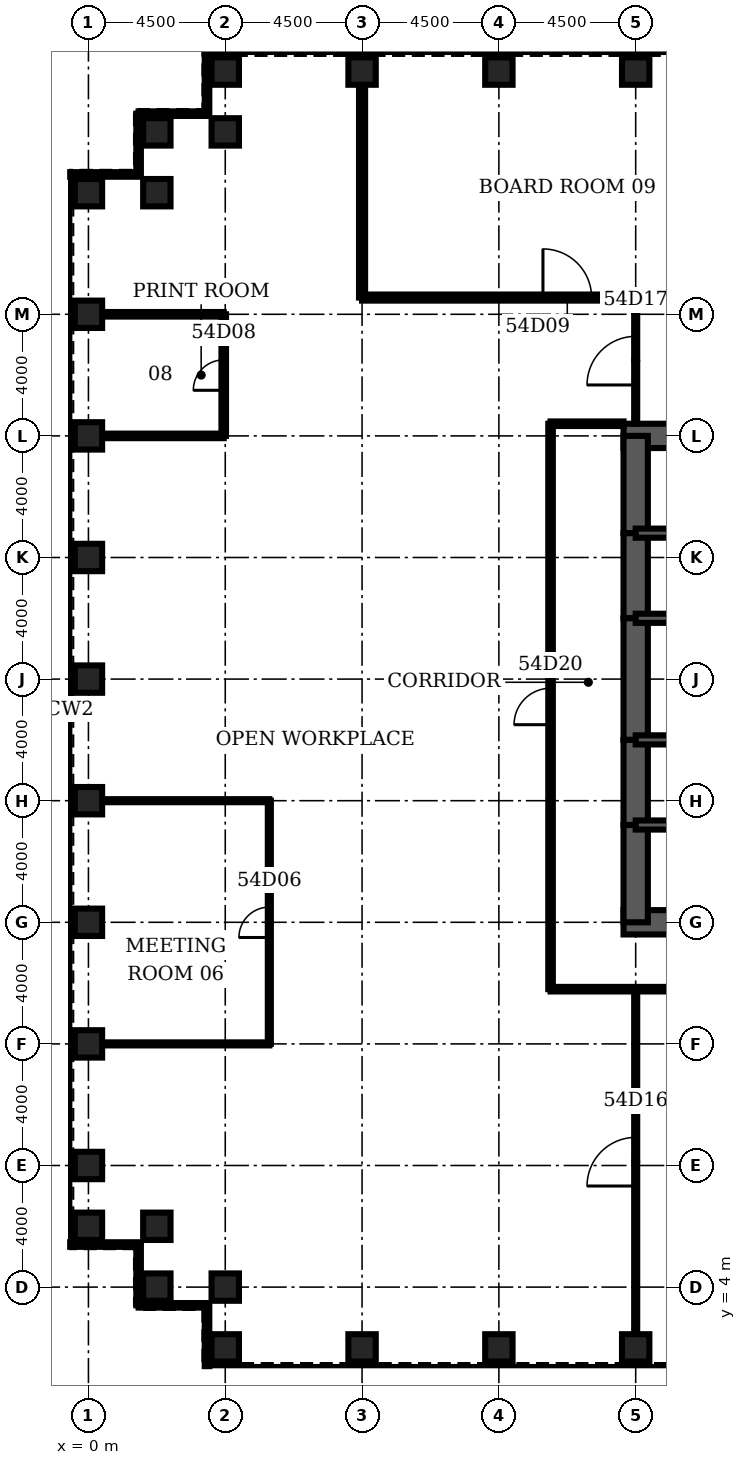
"""IFC4 building model, lengths in metres.
Left out: names, types, materials, properties, quantities, classifications, styles, units other than length and angle.
Written with IfcOpenShell. Run it as: python <this file> out.ifc"""

import sys

from ifc_helpers import new_model, si_unit, direction, frame, frame_2d, origin, origin_2d, place, context, subcontext, project, spatial, rectangle, hollow_rectangle, extrude, element, fill, save


model = new_model("IFC4")
c1 = context("Model", 3, precision=1e-05, world=origin(), true_north=direction((0.0, 1.0)))
c2 = subcontext(c1, "Body", "Model", "MODEL_VIEW")
j1 = project(units=[si_unit("LENGTHUNIT", "METRE"), si_unit("PLANEANGLEUNIT", "RADIAN")], contexts=[c1])
p1 = place(None, origin())
s1 = spatial("IfcSite", under=j1, at=p1, CompositionType="ELEMENT")
p2 = place(p1, origin())
s2 = spatial("IfcBuilding", under=s1, at=p2, CompositionType="ELEMENT")
p3 = place(p2, frame((0.0, 0.0, 240.4)))
s3 = spatial("IfcBuildingStorey", under=s2, at=p3, CompositionType="ELEMENT", Elevation=240.4)
for number, where, z_axis, x_axis in (
    (1, (4.5, 2.0, 0.0), (0.0, 0.0, 1.0), (0.0, 1.0, 0.0)),
    (2, (9.0, 2.0, 0.0), (0.0, 0.0, 1.0), (0.0, 1.0, 0.0)),
    (3, (13.5, 2.0, 0.0), (0.0, 0.0, 1.0), (0.0, 1.0, 0.0)),
    (4, (18.0, 2.0, 0.0), (0.0, 0.0, 1.0), (0.0, 1.0, 0.0)),
    (5, (18.0, 44.0, 0.0), (0.0, 0.0, 1.0), (0.0, 1.0, 0.0)),
    (6, (13.5, 44.0, 0.0), (0.0, 0.0, 1.0), (0.0, 1.0, 0.0)),
    (7, (9.0, 44.0, 0.0), (0.0, 0.0, 1.0), (0.0, 1.0, 0.0)),
    (8, (4.5, 44.0, 0.0), (0.0, 0.0, 1.0), (0.0, 1.0, 0.0)),
    (9, (4.5, 42.0, 0.0), (0.0, 0.0, 1.0), (0.0, 1.0, 0.0)),
    (10, (2.25, 42.0, 0.0), (0.0, 0.0, 1.0), (1.0, 0.0, 0.0)),
    (11, (2.25, 40.0, 0.0), (0.0, 0.0, 1.0), (1.0, 0.0, 0.0)),
    (12, (0.0, 40.0, 0.0), (0.0, 0.0, 1.0), (1.0, 0.0, 0.0)),
    (13, (0.0, 36.0, 0.0), (0.0, 0.0, 1.0), (1.0, 0.0, 0.0)),
    (14, (0.0, 32.0, 0.0), (0.0, 0.0, 1.0), (1.0, 0.0, 0.0)),
    (15, (0.0, 28.0, 0.0), (0.0, 0.0, 1.0), (1.0, 0.0, 0.0)),
    (16, (0.0, 24.0, 0.0), (0.0, 0.0, 1.0), (1.0, 0.0, 0.0)),
    (17, (0.0, 20.0, 0.0), (0.0, 0.0, 1.0), (1.0, 0.0, 0.0)),
    (18, (0.0, 16.0, 0.0), (0.0, 0.0, 1.0), (1.0, 0.0, 0.0)),
    (19, (0.0, 12.0, 0.0), (0.0, 0.0, 1.0), (1.0, 0.0, 0.0)),
    (20, (0.0, 8.0, 0.0), (0.0, 0.0, 1.0), (1.0, 0.0, 0.0)),
    (21, (0.0, 6.0, 0.0), (0.0, 0.0, 1.0), (1.0, 0.0, 0.0)),
    (22, (2.25, 6.0, 0.0), (0.0, 0.0, 1.0), (1.0, 0.0, 0.0)),
    (23, (2.25, 4.0, 0.0), (0.0, 0.0, 1.0), (1.0, 0.0, 0.0)),
    (24, (4.5, 4.0, 0.0), (0.0, 0.0, 1.0), (0.0, 1.0, 0.0)),
):
    element("IfcColumn", number, at=place(p3, frame(where, z_axis=z_axis, x_axis=x_axis)), inside=s3, PredefinedType="COLUMN", context=c2, shape_type="SweptSolid", body=[
        extrude(hollow_rectangle(XDim=0.9, YDim=0.9, WallThickness=0.08, at=origin_2d()), origin(), (0.0, 0.0, 1.0), 4.2),
    ])
for number, where, z_axis, x_axis in (
    (25, (17.6, 16.0, 0.0), (0.0, 0.0, 1.0), (1.0, 0.0, 0.0)),
    (26, (27.0, 32.0, 0.0), (0.0, 0.0, 1.0), (-1.0, 0.0, 0.0)),
):
    element("IfcWall", number, at=place(p3, frame(where, z_axis=z_axis, x_axis=x_axis)), inside=s3, PredefinedType="SHEAR", context=c2, shape_type="SweptSolid", body=[
        extrude(rectangle(XDim=9.4, YDim=0.8, at=frame_2d((4.7, 0.0))), origin(), (0.0, 0.0, 1.0), 4.2),
    ])
p4 = place(p3, frame((18.0, 32.0, 0.0), z_axis=(0.0, 0.0, 1.0), x_axis=(0.0, -1.0, 0.0)))
e27 = element("IfcWall", 27, at=p4, inside=s3, PredefinedType="SHEAR", context=c2, shape_type="SweptSolid", body=[
    extrude(rectangle(XDim=3.2, YDim=0.8, at=frame_2d((1.6, 0.0))), origin(), (0.0, 0.0, 1.0), 4.2),
])
p5 = place(p3, frame((18.0, 28.8, 0.0), z_axis=(0.0, 0.0, 1.0), x_axis=(0.0, -1.0, 0.0)))
e28 = element("IfcWall", 28, at=p5, inside=s3, PredefinedType="SHEAR", context=c2, shape_type="SweptSolid", body=[
    extrude(rectangle(XDim=2.8, YDim=0.8, at=frame_2d((1.4, 0.0))), origin(), (0.0, 0.0, 1.0), 4.2),
])
p6 = place(p5, frame((0.4, 0.0, 0.0)))
e29 = element("IfcOpeningElement", 29, at=p6, cuts=e28, PredefinedType="OPENING", context=c2, shape_type="SweptSolid", body=[
    extrude(rectangle(XDim=1.8, YDim=2.1, at=frame_2d((0.9, 1.05))), frame((0.0, 0.41, 0.0), z_axis=(0.0, -1.0, 0.0), x_axis=(1.0, 0.0, 0.0)), (0.0, 0.0, 1.0), 0.82),
])
p7 = place(p3, frame((18.0, 26.0, 0.0), z_axis=(0.0, 0.0, 1.0), x_axis=(0.0, -1.0, 0.0)))
e30 = element("IfcWall", 30, at=p7, inside=s3, PredefinedType="SHEAR", context=c2, shape_type="SweptSolid", body=[
    extrude(rectangle(XDim=4.0, YDim=0.8, at=frame_2d((2.0, 0.0))), origin(), (0.0, 0.0, 1.0), 4.2),
])
p8 = place(p3, frame((18.0, 22.0, 0.0), z_axis=(0.0, 0.0, 1.0), x_axis=(0.0, -1.0, 0.0)))
e31 = element("IfcWall", 31, at=p8, inside=s3, PredefinedType="SHEAR", context=c2, shape_type="SweptSolid", body=[
    extrude(rectangle(XDim=2.8, YDim=0.8, at=frame_2d((1.4, 0.0))), origin(), (0.0, 0.0, 1.0), 4.2),
])
p9 = place(p8, frame((0.6, 0.0, 0.0)))
e32 = element("IfcOpeningElement", 32, at=p9, cuts=e31, PredefinedType="OPENING", context=c2, shape_type="SweptSolid", body=[
    extrude(rectangle(XDim=1.8, YDim=2.1, at=frame_2d((0.9, 1.05))), frame((0.0, 0.41, 0.0), z_axis=(0.0, -1.0, 0.0), x_axis=(1.0, 0.0, 0.0)), (0.0, 0.0, 1.0), 0.82),
])
p10 = place(p3, frame((18.0, 19.2, 0.0), z_axis=(0.0, 0.0, 1.0), x_axis=(0.0, -1.0, 0.0)))
e33 = element("IfcWall", 33, at=p10, inside=s3, PredefinedType="SHEAR", context=c2, shape_type="SweptSolid", body=[
    extrude(rectangle(XDim=3.2, YDim=0.8, at=frame_2d((1.6, 0.0))), origin(), (0.0, 0.0, 1.0), 4.2),
])
p11 = place(p3, frame((18.0, 19.2, 0.0), z_axis=(0.0, 0.0, 1.0), x_axis=(1.0, 0.0, 0.0)))
e34 = element("IfcWall", 34, at=p11, inside=s3, PredefinedType="SOLIDWALL", context=c2, shape_type="SweptSolid", body=[
    extrude(rectangle(XDim=9.0, YDim=0.3, at=frame_2d((4.5, 0.0))), origin(), (0.0, 0.0, 1.0), 4.2),
])
p12 = place(p11, frame((0.65, 0.0, 0.0)))
e35 = element("IfcOpeningElement", 35, at=p12, cuts=e34, PredefinedType="OPENING", context=c2, shape_type="SweptSolid", body=[
    extrude(rectangle(XDim=1.0, YDim=2.1, at=frame_2d((0.5, 1.05))), frame((0.0, 0.16, 0.0), z_axis=(0.0, -1.0, 0.0), x_axis=(1.0, 0.0, 0.0)), (0.0, 0.0, 1.0), 0.32),
])
p13 = place(p3, frame((18.0, 28.8, 0.0), z_axis=(0.0, 0.0, 1.0), x_axis=(1.0, 0.0, 0.0)))
e36 = element("IfcWall", 36, at=p13, inside=s3, PredefinedType="SOLIDWALL", context=c2, shape_type="SweptSolid", body=[
    extrude(rectangle(XDim=9.0, YDim=0.3, at=frame_2d((4.5, 0.0))), origin(), (0.0, 0.0, 1.0), 4.2),
])
p14 = place(p13, frame((0.65, 0.0, 0.0)))
e37 = element("IfcOpeningElement", 37, at=p14, cuts=e36, PredefinedType="OPENING", context=c2, shape_type="SweptSolid", body=[
    extrude(rectangle(XDim=1.0, YDim=2.1, at=frame_2d((0.5, 1.05))), frame((0.0, 0.16, 0.0), z_axis=(0.0, -1.0, 0.0), x_axis=(1.0, 0.0, 0.0)), (0.0, 0.0, 1.0), 0.32),
])
p15 = place(p3, frame((18.0, 22.0, 0.0), z_axis=(0.0, 0.0, 1.0), x_axis=(1.0, 0.0, 0.0)))
e38 = element("IfcWall", 38, at=p15, inside=s3, PredefinedType="SOLIDWALL", context=c2, shape_type="SweptSolid", body=[
    extrude(rectangle(XDim=6.0, YDim=0.3, at=frame_2d((3.0, 0.0))), origin(), (0.0, 0.0, 1.0), 4.2),
])
p16 = place(p15, frame((4.4, 0.0, 0.0)))
e39 = element("IfcOpeningElement", 39, at=p16, cuts=e38, PredefinedType="OPENING", context=c2, shape_type="SweptSolid", body=[
    extrude(rectangle(XDim=1.0, YDim=2.1, at=frame_2d((0.5, 1.05))), frame((0.0, 0.16, 0.0), z_axis=(0.0, -1.0, 0.0), x_axis=(1.0, 0.0, 0.0)), (0.0, 0.0, 1.0), 0.32),
])
p17 = place(p15, frame((0.65, 0.0, 0.0)))
e40 = element("IfcOpeningElement", 40, at=p17, cuts=e38, PredefinedType="OPENING", context=c2, shape_type="SweptSolid", body=[
    extrude(rectangle(XDim=1.0, YDim=2.1, at=frame_2d((0.5, 1.05))), frame((0.0, 0.16, 0.0), z_axis=(0.0, -1.0, 0.0), x_axis=(1.0, 0.0, 0.0)), (0.0, 0.0, 1.0), 0.32),
])
p18 = place(p3, frame((18.0, 26.0, 0.0), z_axis=(0.0, 0.0, 1.0), x_axis=(1.0, 0.0, 0.0)))
e41 = element("IfcWall", 41, at=p18, inside=s3, PredefinedType="SOLIDWALL", context=c2, shape_type="SweptSolid", body=[
    extrude(rectangle(XDim=6.0, YDim=0.3, at=frame_2d((3.0, 0.0))), origin(), (0.0, 0.0, 1.0), 4.2),
])
p19 = place(p3, frame((0.45, 12.0, 0.0), z_axis=(0.0, 0.0, 1.0), x_axis=(1.0, 0.0, 0.0)))
e42 = element("IfcWall", 42, at=p19, inside=s3, PredefinedType="PARTITIONING", context=c2, shape_type="SweptSolid", body=[
    extrude(rectangle(XDim=5.5, YDim=0.1, at=frame_2d((2.75, 0.0))), origin(), (0.0, 0.0, 1.0), 3.0),
])
p20 = place(p3, frame((15.2, 13.8, 0.0), z_axis=(0.0, 0.0, 1.0), x_axis=(1.0, 0.0, 0.0)))
e43 = element("IfcWall", 43, at=p20, inside=s3, PredefinedType="PARTITIONING", context=c2, shape_type="SweptSolid", body=[
    extrude(rectangle(XDim=6.8, YDim=0.15, at=frame_2d((3.4, 0.0))), origin(), (0.0, 0.0, 1.0), 3.0),
])
p21 = place(p3, frame((0.45, 20.0, 0.0), z_axis=(0.0, 0.0, 1.0), x_axis=(1.0, 0.0, 0.0)))
e44 = element("IfcWall", 44, at=p21, inside=s3, PredefinedType="PARTITIONING", context=c2, shape_type="SweptSolid", body=[
    extrude(rectangle(XDim=5.5, YDim=0.1, at=frame_2d((2.75, 0.0))), origin(), (0.0, 0.0, 1.0), 3.0),
])
p22 = place(p3, frame((0.45, 32.0, 0.0), z_axis=(0.0, 0.0, 1.0), x_axis=(1.0, 0.0, 0.0)))
e45 = element("IfcWall", 45, at=p22, inside=s3, PredefinedType="PARTITIONING", context=c2, shape_type="SweptSolid", body=[
    extrude(rectangle(XDim=4.0, YDim=0.15, at=frame_2d((2.0, 0.0))), origin(), (0.0, 0.0, 1.0), 3.0),
])
p23 = place(p3, frame((15.2, 32.4, 0.0), z_axis=(0.0, 0.0, 1.0), x_axis=(1.0, 0.0, 0.0)))
e46 = element("IfcWall", 46, at=p23, inside=s3, PredefinedType="PARTITIONING", context=c2, shape_type="SweptSolid", body=[
    extrude(rectangle(XDim=2.4, YDim=0.15, at=frame_2d((1.2, 0.0))), origin(), (0.0, 0.0, 1.0), 3.0),
])
p24 = place(p3, frame((0.45, 36.0, 0.0), z_axis=(0.0, 0.0, 1.0), x_axis=(1.0, 0.0, 0.0)))
e47 = element("IfcWall", 47, at=p24, inside=s3, PredefinedType="PARTITIONING", context=c2, shape_type="SweptSolid", body=[
    extrude(rectangle(XDim=4.0, YDim=0.15, at=frame_2d((2.0, 0.0))), origin(), (0.0, 0.0, 1.0), 3.0),
])
p25 = place(p3, frame((9.0, 36.55, 0.0), z_axis=(0.0, 0.0, 1.0), x_axis=(1.0, 0.0, 0.0)))
e48 = element("IfcWall", 48, at=p25, inside=s3, PredefinedType="PARTITIONING", context=c2, shape_type="SweptSolid", body=[
    extrude(rectangle(XDim=13.5, YDim=0.2, at=frame_2d((6.75, 0.0))), origin(), (0.0, 0.0, 1.0), 3.0),
])
p26 = place(p25, frame((5.95, 0.0, 0.0)))
e49 = element("IfcOpeningElement", 49, at=p26, cuts=e48, PredefinedType="OPENING", context=c2, shape_type="SweptSolid", body=[
    extrude(rectangle(XDim=1.6, YDim=2.1, at=frame_2d((0.8, 1.05))), frame((0.0, 0.11, 0.0), z_axis=(0.0, -1.0, 0.0), x_axis=(1.0, 0.0, 0.0)), (0.0, 0.0, 1.0), 0.22),
])
p27 = place(p3, frame((4.45, 32.0, 0.0), z_axis=(0.0, 0.0, 1.0), x_axis=(0.0, 1.0, 0.0)))
e50 = element("IfcWall", 50, at=p27, inside=s3, PredefinedType="PARTITIONING", context=c2, shape_type="SweptSolid", body=[
    extrude(rectangle(XDim=4.0, YDim=0.15, at=frame_2d((2.0, 0.0))), origin(), (0.0, 0.0, 1.0), 3.0),
])
p28 = place(p27, frame((1.5, 0.0, 0.0)))
e51 = element("IfcOpeningElement", 51, at=p28, cuts=e50, PredefinedType="OPENING", context=c2, shape_type="SweptSolid", body=[
    extrude(rectangle(XDim=1.0, YDim=2.1, at=frame_2d((0.5, 1.05))), frame((0.0, 0.085, 0.0), z_axis=(0.0, -1.0, 0.0), x_axis=(1.0, 0.0, 0.0)), (0.0, 0.0, 1.0), 0.17),
])
p29 = place(p3, frame((5.95, 12.0, 0.0), z_axis=(0.0, 0.0, 1.0), x_axis=(0.0, 1.0, 0.0)))
e52 = element("IfcWall", 52, at=p29, inside=s3, PredefinedType="PARTITIONING", context=c2, shape_type="SweptSolid", body=[
    extrude(rectangle(XDim=8.0, YDim=0.1, at=frame_2d((4.0, 0.0))), origin(), (0.0, 0.0, 1.0), 3.0),
])
p30 = place(p29, frame((3.5, 0.0, 0.0)))
e53 = element("IfcOpeningElement", 53, at=p30, cuts=e52, PredefinedType="OPENING", context=c2, shape_type="SweptSolid", body=[
    extrude(rectangle(XDim=1.0, YDim=2.1, at=frame_2d((0.5, 1.05))), frame((0.0, 0.06, 0.0), z_axis=(0.0, -1.0, 0.0), x_axis=(1.0, 0.0, 0.0)), (0.0, 0.0, 1.0), 0.12),
])
p31 = place(p3, frame((9.0, 36.55, 0.0), z_axis=(0.0, 0.0, 1.0), x_axis=(0.0, 1.0, 0.0)))
e54 = element("IfcWall", 54, at=p31, inside=s3, PredefinedType="PARTITIONING", context=c2, shape_type="SweptSolid", body=[
    extrude(rectangle(XDim=7.0, YDim=0.2, at=frame_2d((3.5, 0.0))), origin(), (0.0, 0.0, 1.0), 3.0),
])
p32 = place(p3, frame((15.2, 13.8, 0.0), z_axis=(0.0, 0.0, 1.0), x_axis=(0.0, 1.0, 0.0)))
e55 = element("IfcWall", 55, at=p32, inside=s3, PredefinedType="PARTITIONING", context=c2, shape_type="SweptSolid", body=[
    extrude(rectangle(XDim=18.6, YDim=0.15, at=frame_2d((9.3, 0.0))), origin(), (0.0, 0.0, 1.0), 3.0),
])
p33 = place(p32, frame((8.7, 0.0, 0.0)))
e56 = element("IfcOpeningElement", 56, at=p33, cuts=e55, PredefinedType="OPENING", context=c2, shape_type="SweptSolid", body=[
    extrude(rectangle(XDim=1.2, YDim=2.1, at=frame_2d((0.6, 1.05))), frame((0.0, 0.085, 0.0), z_axis=(0.0, -1.0, 0.0), x_axis=(1.0, 0.0, 0.0)), (0.0, 0.0, 1.0), 0.17),
])
p34 = place(p3, frame((18.0, 2.45, 0.0), z_axis=(0.0, 0.0, 1.0), x_axis=(0.0, 1.0, 0.0)))
e57 = element("IfcWall", 57, at=p34, inside=s3, PredefinedType="PARTITIONING", context=c2, shape_type="SweptSolid", body=[
    extrude(rectangle(XDim=11.35, YDim=0.1, at=frame_2d((5.675, 0.0))), origin(), (0.0, 0.0, 1.0), 3.0),
])
p35 = place(p34, frame((4.875, 0.0, 0.0)))
e58 = element("IfcOpeningElement", 58, at=p35, cuts=e57, PredefinedType="OPENING", context=c2, shape_type="SweptSolid", body=[
    extrude(rectangle(XDim=1.6, YDim=2.1, at=frame_2d((0.8, 1.05))), frame((0.0, 0.06, 0.0), z_axis=(0.0, -1.0, 0.0), x_axis=(1.0, 0.0, 0.0)), (0.0, 0.0, 1.0), 0.12),
])
p36 = place(p3, frame((18.0, 32.4, 0.0), z_axis=(0.0, 0.0, 1.0), x_axis=(0.0, 1.0, 0.0)))
e59 = element("IfcWall", 59, at=p36, inside=s3, PredefinedType="PARTITIONING", context=c2, shape_type="SweptSolid", body=[
    extrude(rectangle(XDim=4.15, YDim=0.1, at=frame_2d((2.075, 0.0))), origin(), (0.0, 0.0, 1.0), 3.0),
])
p37 = place(p36, frame((1.275, 0.0, 0.0)))
e60 = element("IfcOpeningElement", 60, at=p37, cuts=e59, PredefinedType="OPENING", context=c2, shape_type="SweptSolid", body=[
    extrude(rectangle(XDim=1.6, YDim=2.1, at=frame_2d((0.8, 1.05))), frame((0.0, 0.06, 0.0), z_axis=(0.0, -1.0, 0.0), x_axis=(1.0, 0.0, 0.0)), (0.0, 0.0, 1.0), 0.12),
])
p38 = place(p3, frame((3.9, 44.6, 0.0), z_axis=(0.0, 0.0, 1.0), x_axis=(0.0, -1.0, 0.0)))
e61 = element("IfcWall", 61, at=p38, inside=s3, PredefinedType="ELEMENTEDWALL", context=c2, shape_type="SweptSolid", body=[
    extrude(rectangle(XDim=2.0, YDim=0.15, at=frame_2d((1.0, 0.0))), origin(), (0.0, 0.0, 1.0), 4.04),
])
p39 = place(p3, frame((3.9, 42.6, 0.0), z_axis=(0.0, 0.0, 1.0), x_axis=(-1.0, 0.0, 0.0)))
e62 = element("IfcWall", 62, at=p39, inside=s3, PredefinedType="ELEMENTEDWALL", context=c2, shape_type="SweptSolid", body=[
    extrude(rectangle(XDim=2.25, YDim=0.15, at=frame_2d((1.125, 0.0))), origin(), (0.0, 0.0, 1.0), 4.04),
])
p40 = place(p3, frame((1.65, 42.6, 0.0), z_axis=(0.0, 0.0, 1.0), x_axis=(0.0, -1.0, 0.0)))
e63 = element("IfcWall", 63, at=p40, inside=s3, PredefinedType="ELEMENTEDWALL", context=c2, shape_type="SweptSolid", body=[
    extrude(rectangle(XDim=2.0, YDim=0.15, at=frame_2d((1.0, 0.0))), origin(), (0.0, 0.0, 1.0), 4.04),
])
for number, where, z_axis, x_axis in (
    (64, (1.65, 40.6, 0.0), (0.0, 0.0, 1.0), (-1.0, 0.0, 0.0)),
    (65, (-0.6, 5.4, 0.0), (0.0, 0.0, 1.0), (1.0, 0.0, 0.0)),
):
    element("IfcWall", number, at=place(p3, frame(where, z_axis=z_axis, x_axis=x_axis)), inside=s3, PredefinedType="ELEMENTEDWALL", context=c2, shape_type="SweptSolid", body=[
        extrude(rectangle(XDim=2.25, YDim=0.15, at=frame_2d((1.125, 0.0))), origin(), (0.0, 0.0, 1.0), 4.04),
    ])
p41 = place(p3, frame((1.65, 5.4, 0.0), z_axis=(0.0, 0.0, 1.0), x_axis=(0.0, -1.0, 0.0)))
e66 = element("IfcWall", 66, at=p41, inside=s3, PredefinedType="ELEMENTEDWALL", context=c2, shape_type="SweptSolid", body=[
    extrude(rectangle(XDim=2.0, YDim=0.15, at=frame_2d((1.0, 0.0))), origin(), (0.0, 0.0, 1.0), 4.04),
])
p42 = place(p3, frame((1.65, 3.4, 0.0), z_axis=(0.0, 0.0, 1.0), x_axis=(1.0, 0.0, 0.0)))
e67 = element("IfcWall", 67, at=p42, inside=s3, PredefinedType="ELEMENTEDWALL", context=c2, shape_type="SweptSolid", body=[
    extrude(rectangle(XDim=2.25, YDim=0.15, at=frame_2d((1.125, 0.0))), origin(), (0.0, 0.0, 1.0), 4.04),
])
p43 = place(p3, frame((3.9, 3.4, 0.0), z_axis=(0.0, 0.0, 1.0), x_axis=(0.0, -1.0, 0.0)))
e68 = element("IfcWall", 68, at=p43, inside=s3, PredefinedType="ELEMENTEDWALL", context=c2, shape_type="SweptSolid", body=[
    extrude(rectangle(XDim=2.0, YDim=0.15, at=frame_2d((1.0, 0.0))), origin(), (0.0, 0.0, 1.0), 4.04),
])
p44 = place(p30, origin())
e69 = element("IfcDoor", 69, at=p44, inside=s3, OperationType="SINGLE_SWING_LEFT", PredefinedType="DOOR", context=c2, shape_type="SweptSolid", body=[
    extrude(rectangle(XDim=1.0, YDim=2.1, at=frame_2d((0.5, 1.05))), frame((0.0, 0.025, 0.0), z_axis=(0.0, -1.0, 0.0), x_axis=(1.0, 0.0, 0.0)), (0.0, 0.0, 1.0), 0.05),
])
fill(e53, e69)
p45 = place(p28, origin())
e70 = element("IfcDoor", 70, at=p45, inside=s3, OperationType="SINGLE_SWING_LEFT", PredefinedType="DOOR", context=c2, shape_type="SweptSolid", body=[
    extrude(rectangle(XDim=1.0, YDim=2.1, at=frame_2d((0.5, 1.05))), frame((0.0, 0.025, 0.0), z_axis=(0.0, -1.0, 0.0), x_axis=(1.0, 0.0, 0.0)), (0.0, 0.0, 1.0), 0.05),
])
fill(e51, e70)
p46 = place(p26, origin())
e71 = element("IfcDoor", 71, at=p46, inside=s3, OperationType="SINGLE_SWING_LEFT", PredefinedType="DOOR", context=c2, shape_type="SweptSolid", body=[
    extrude(rectangle(XDim=1.6, YDim=2.1, at=frame_2d((0.8, 1.05))), frame((0.0, 0.025, 0.0), z_axis=(0.0, -1.0, 0.0), x_axis=(1.0, 0.0, 0.0)), (0.0, 0.0, 1.0), 0.05),
])
fill(e49, e71)
p47 = place(p35, origin())
e72 = element("IfcDoor", 72, at=p47, inside=s3, OperationType="SINGLE_SWING_LEFT", PredefinedType="DOOR", context=c2, shape_type="SweptSolid", body=[
    extrude(rectangle(XDim=1.6, YDim=2.1, at=frame_2d((0.8, 1.05))), frame((0.0, 0.025, 0.0), z_axis=(0.0, -1.0, 0.0), x_axis=(1.0, 0.0, 0.0)), (0.0, 0.0, 1.0), 0.05),
])
fill(e58, e72)
p48 = place(p37, origin())
e73 = element("IfcDoor", 73, at=p48, inside=s3, OperationType="SINGLE_SWING_LEFT", PredefinedType="DOOR", context=c2, shape_type="SweptSolid", body=[
    extrude(rectangle(XDim=1.6, YDim=2.1, at=frame_2d((0.8, 1.05))), frame((0.0, 0.025, 0.0), z_axis=(0.0, -1.0, 0.0), x_axis=(1.0, 0.0, 0.0)), (0.0, 0.0, 1.0), 0.05),
])
fill(e60, e73)
p49 = place(p33, origin())
e74 = element("IfcDoor", 74, at=p49, inside=s3, OperationType="SINGLE_SWING_LEFT", PredefinedType="DOOR", context=c2, shape_type="SweptSolid", body=[
    extrude(rectangle(XDim=1.2, YDim=2.1, at=frame_2d((0.6, 1.05))), frame((0.0, 0.025, 0.0), z_axis=(0.0, -1.0, 0.0), x_axis=(1.0, 0.0, 0.0)), (0.0, 0.0, 1.0), 0.05),
])
fill(e56, e74)
p50 = place(p12, origin())
e75 = element("IfcDoor", 75, at=p50, inside=s3, OperationType="SINGLE_SWING_LEFT", PredefinedType="DOOR", context=c2, shape_type="SweptSolid", body=[
    extrude(rectangle(XDim=1.0, YDim=2.1, at=frame_2d((0.5, 1.05))), frame((0.0, 0.025, 0.0), z_axis=(0.0, -1.0, 0.0), x_axis=(1.0, 0.0, 0.0)), (0.0, 0.0, 1.0), 0.05),
])
fill(e35, e75)
p51 = place(p14, origin())
e76 = element("IfcDoor", 76, at=p51, inside=s3, OperationType="SINGLE_SWING_LEFT", PredefinedType="DOOR", context=c2, shape_type="SweptSolid", body=[
    extrude(rectangle(XDim=1.0, YDim=2.1, at=frame_2d((0.5, 1.05))), frame((0.0, 0.025, 0.0), z_axis=(0.0, -1.0, 0.0), x_axis=(1.0, 0.0, 0.0)), (0.0, 0.0, 1.0), 0.05),
])
fill(e37, e76)
p52 = place(p9, origin())
e77 = element("IfcDoor", 77, at=p52, inside=s3, OperationType="SINGLE_SWING_LEFT", PredefinedType="DOOR", context=c2, shape_type="SweptSolid", body=[
    extrude(rectangle(XDim=1.8, YDim=2.1, at=frame_2d((0.9, 1.05))), frame((0.0, 0.4, 0.0), z_axis=(0.0, -1.0, 0.0), x_axis=(1.0, 0.0, 0.0)), (0.0, 0.0, 1.0), 0.8),
])
fill(e32, e77)
p53 = place(p6, origin())
e78 = element("IfcDoor", 78, at=p53, inside=s3, OperationType="SINGLE_SWING_LEFT", PredefinedType="DOOR", context=c2, shape_type="SweptSolid", body=[
    extrude(rectangle(XDim=1.8, YDim=2.1, at=frame_2d((0.9, 1.05))), frame((0.0, 0.4, 0.0), z_axis=(0.0, -1.0, 0.0), x_axis=(1.0, 0.0, 0.0)), (0.0, 0.0, 1.0), 0.8),
])
fill(e29, e78)
p54 = place(p17, origin())
e79 = element("IfcDoor", 79, at=p54, inside=s3, OperationType="SINGLE_SWING_LEFT", PredefinedType="DOOR", context=c2, shape_type="SweptSolid", body=[
    extrude(rectangle(XDim=1.0, YDim=2.1, at=frame_2d((0.5, 1.05))), frame((0.0, 0.025, 0.0), z_axis=(0.0, -1.0, 0.0), x_axis=(1.0, 0.0, 0.0)), (0.0, 0.0, 1.0), 0.05),
])
fill(e40, e79)
save(model, sys.argv[1])
